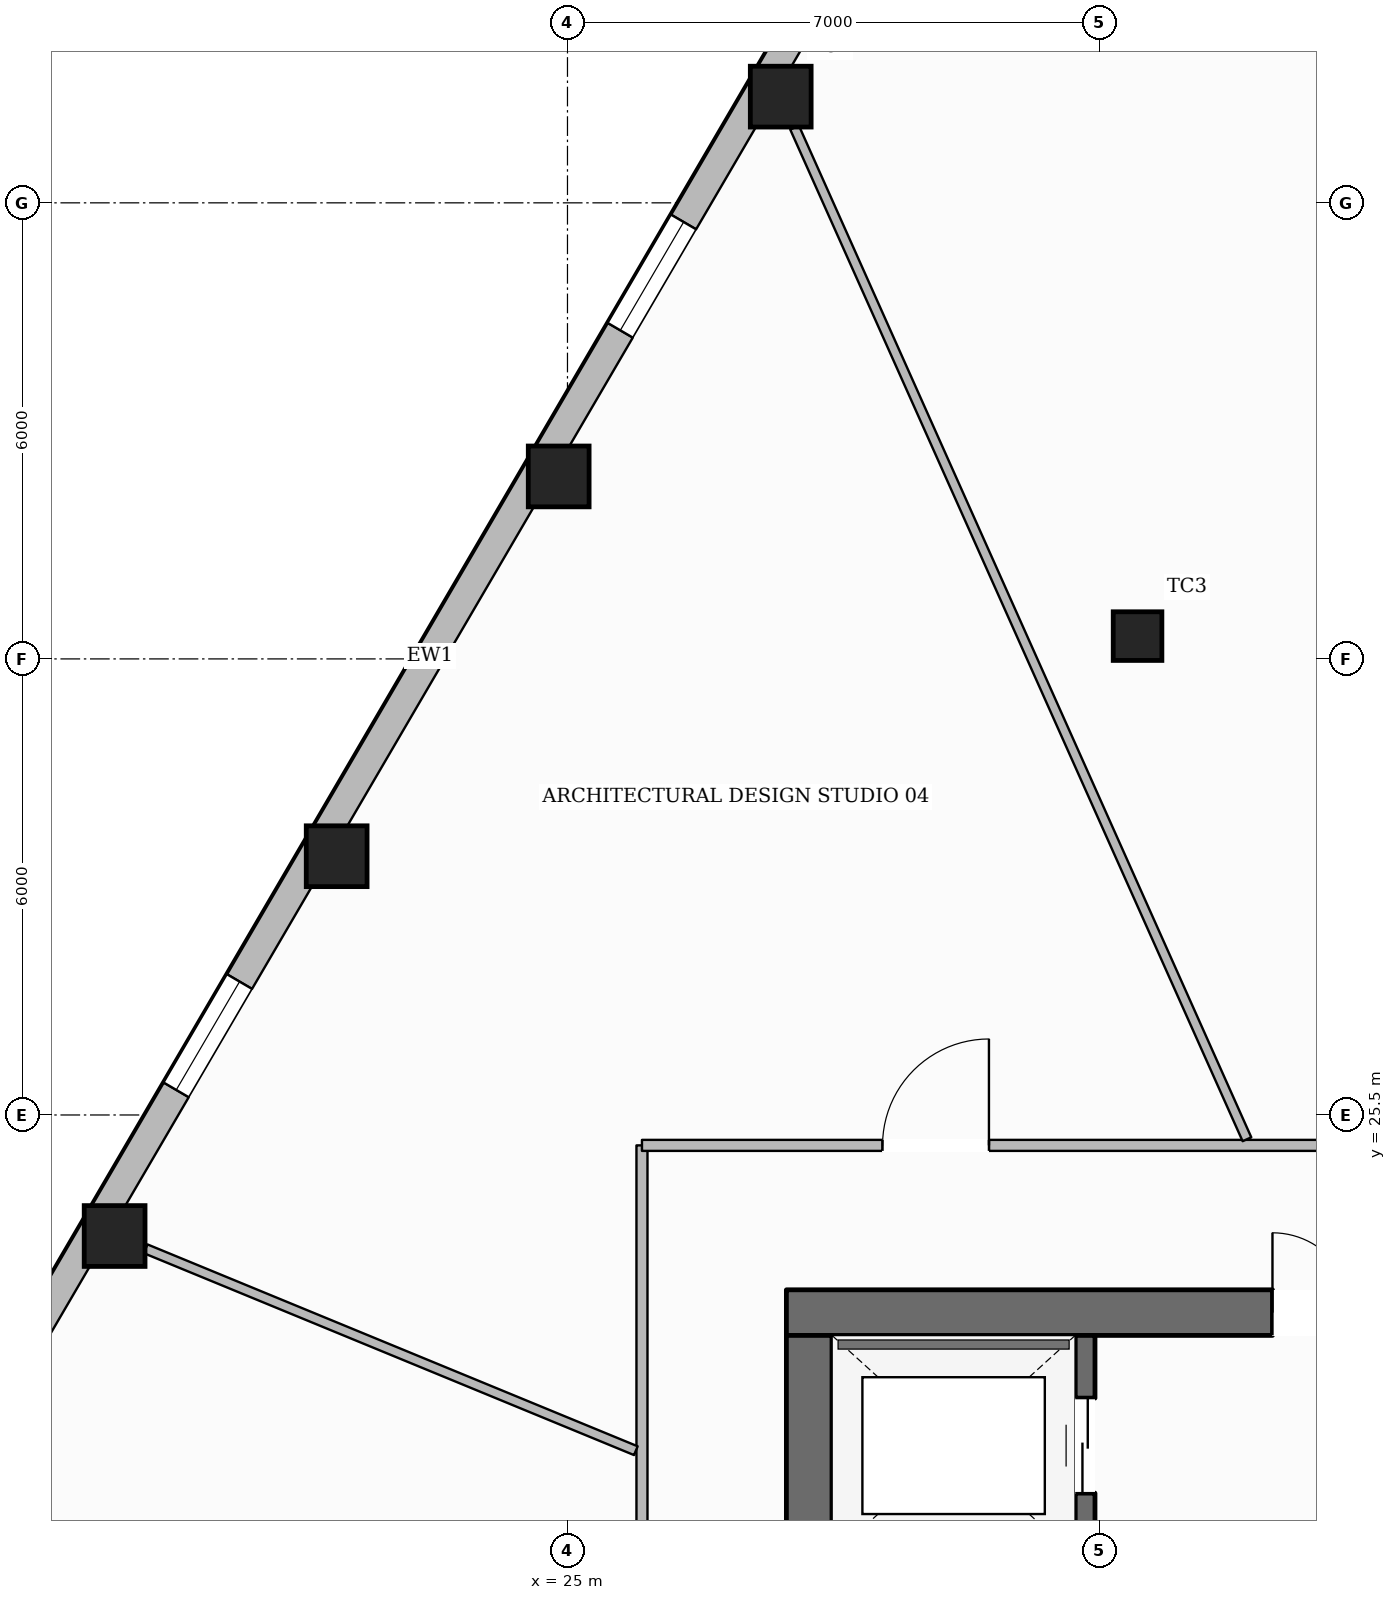
"""IFC4 building model, lengths in metres.
Left out: names, types, materials, properties, quantities, classifications, styles, units other than length and angle.
Written with IfcOpenShell. Run it as: python <this file> out.ifc"""

import sys

from ifc_helpers import new_model, si_unit, direction, frame, frame_2d, origin, origin_2d, place, context, subcontext, project, spatial, rectangle, hollow_rectangle, extrude, element, fill, save


model = new_model("IFC4")
c1 = context("Model", 3, precision=1e-05, world=origin(), true_north=direction((0.0, 1.0)))
c2 = subcontext(c1, "Body", "Model", "MODEL_VIEW")
j1 = project(units=[si_unit("LENGTHUNIT", "METRE"), si_unit("PLANEANGLEUNIT", "RADIAN")], contexts=[c1])
p1 = place(None, origin())
s1 = spatial("IfcSite", under=j1, at=p1, CompositionType="ELEMENT")
p2 = place(p1, origin())
s2 = spatial("IfcBuilding", under=s1, at=p2, CompositionType="ELEMENT")
p3 = place(p2, frame((0.0, 0.0, 59.9)))
s3 = spatial("IfcBuildingStorey", under=s2, at=p3, CompositionType="ELEMENT", Elevation=59.9)
p4 = place(p3, frame((27.88, 22.9, 0.0), z_axis=(0.0, 0.0, 1.0), x_axis=(1.0, 0.0, 0.0)))
e1 = element("IfcWall", 1, at=p4, inside=s3, PredefinedType="SOLIDWALL", context=c2, shape_type="SweptSolid", body=[
    extrude(rectangle(XDim=20.24, YDim=0.6, at=frame_2d((10.12, 0.0))), origin(), (0.0, 0.0, 1.0), 3.59),
])
p5 = place(p4, frame((6.395, 0.0, 0.0)))
e2 = element("IfcOpeningElement", 2, at=p5, cuts=e1, PredefinedType="OPENING", context=c2, shape_type="SweptSolid", body=[
    extrude(rectangle(XDim=1.05, YDim=2.15, at=frame_2d((0.525, 1.075))), frame((0.0, 0.31, 0.0), z_axis=(0.0, -1.0, 0.0), x_axis=(1.0, 0.0, 0.0)), (0.0, 0.0, 1.0), 0.62),
])
p6 = place(p4, frame((12.795, 0.0, 0.0)))
e3 = element("IfcOpeningElement", 3, at=p6, cuts=e1, PredefinedType="OPENING", context=c2, shape_type="SweptSolid", body=[
    extrude(rectangle(XDim=1.05, YDim=2.15, at=frame_2d((0.525, 1.075))), frame((0.0, 0.31, 0.0), z_axis=(0.0, -1.0, 0.0), x_axis=(1.0, 0.0, 0.0)), (0.0, 0.0, 1.0), 0.62),
])
p7 = place(p3, frame((28.18, 9.6, 0.0), z_axis=(0.0, 0.0, 1.0), x_axis=(0.0, 1.0, 0.0)))
e4 = element("IfcWall", 4, at=p7, inside=s3, PredefinedType="SOLIDWALL", context=c2, shape_type="SweptSolid", body=[
    extrude(rectangle(XDim=13.0, YDim=0.6, at=frame_2d((6.5, 0.0))), origin(), (0.0, 0.0, 1.0), 3.59),
])
p8 = place(p7, frame((0.2, 0.0, 0.0)))
e5 = element("IfcOpeningElement", 5, at=p8, cuts=e4, PredefinedType="OPENING", context=c2, shape_type="SweptSolid", body=[
    extrude(rectangle(XDim=1.1, YDim=2.15, at=frame_2d((0.55, 1.075))), frame((0.0, 0.31, 0.0), z_axis=(0.0, -1.0, 0.0), x_axis=(1.0, 0.0, 0.0)), (0.0, 0.0, 1.0), 0.62),
])
p9 = place(p7, frame((8.4, 0.0, 0.0)))
e6 = element("IfcOpeningElement", 6, at=p9, cuts=e4, PredefinedType="OPENING", context=c2, shape_type="SweptSolid", body=[
    extrude(rectangle(XDim=0.9, YDim=2.1, at=frame_2d((0.45, 1.05))), frame((0.0, 0.31, 0.0), z_axis=(0.0, -1.0, 0.0), x_axis=(1.0, 0.0, 0.0)), (0.0, 0.0, 1.0), 0.62),
])
p10 = place(p3, frame((31.81, 9.6, 0.0), z_axis=(0.0, 0.0, 1.0), x_axis=(0.0, 1.0, 0.0)))
e7 = element("IfcWall", 7, at=p10, inside=s3, PredefinedType="SHEAR", context=c2, shape_type="SweptSolid", body=[
    extrude(rectangle(XDim=13.0, YDim=0.26, at=frame_2d((6.5, 0.0))), origin(), (0.0, 0.0, 1.0), 3.59),
])
p11 = place(p10, frame((10.925, 0.0, 0.0)))
e8 = element("IfcOpeningElement", 8, at=p11, cuts=e7, PredefinedType="OPENING", context=c2, shape_type="SweptSolid", body=[
    extrude(rectangle(XDim=1.25, YDim=2.25, at=frame_2d((0.625, 1.125))), frame((0.0, 0.14, 0.0), z_axis=(0.0, -1.0, 0.0), x_axis=(1.0, 0.0, 0.0)), (0.0, 0.0, 1.0), 0.28),
])
for number, where, z_axis, x_axis in (
    (9, (27.805, 38.897, 0.0), (0.0, 0.0, 1.0), (1.0, 0.0, 0.0)),
    (10, (24.885, 33.901, 0.0), (0.0, 0.0, 1.0), (1.0, 0.0, 0.0)),
    (11, (21.963, 28.904, 0.0), (0.0, 0.0, 1.0), (1.0, 0.0, 0.0)),
    (12, (19.042, 23.908, 0.0), (0.0, 0.0, 1.0), (1.0, 0.0, 0.0)),
):
    element("IfcColumn", number, at=place(p3, frame(where, z_axis=z_axis, x_axis=x_axis)), inside=s3, PredefinedType="COLUMN", context=c2, shape_type="SweptSolid", body=[
        extrude(hollow_rectangle(XDim=0.8, YDim=0.8, WallThickness=0.036, at=origin_2d()), origin(), (0.0, 0.0, 1.0), 3.59),
    ])
p12 = place(p3, frame((32.5, 31.8, 0.0), z_axis=(0.0, 0.0, 1.0), x_axis=(1.0, 0.0, 0.0)))
e13 = element("IfcColumn", 13, at=p12, inside=s3, PredefinedType="COLUMN", context=c2, shape_type="SweptSolid", body=[
    extrude(hollow_rectangle(XDim=0.64, YDim=0.64, WallThickness=0.028, at=origin_2d()), origin(), (0.0, 0.0, 1.0), 3.59),
])
p13 = place(p3, frame((12.724, 13.636, 0.0), z_axis=(0.0, 0.0, 1.0), x_axis=(0.504702471056, 0.863293354376, 0.0)))
e14 = element("IfcWall", 14, at=p13, inside=s3, PredefinedType="STANDARD", context=c2, shape_type="SweptSolid", body=[
    extrude(rectangle(XDim=35.682, YDim=0.38, at=frame_2d((17.841, 0.0))), origin(), (0.0, 0.0, 1.0), 2.97),
])
p14 = place(p13, frame((31.488, 0.0, 0.65)))
e15 = element("IfcOpeningElement", 15, at=p14, cuts=e14, PredefinedType="OPENING", context=c2, shape_type="SweptSolid", body=[
    extrude(rectangle(XDim=1.65, YDim=1.75, at=frame_2d((0.825, 0.875))), frame((0.0, 0.2, 0.0), z_axis=(0.0, -1.0, 0.0), x_axis=(1.0, 0.0, 0.0)), (0.0, 0.0, 1.0), 0.4),
])
p15 = place(p13, frame((25.701, 0.0, 0.65)))
e16 = element("IfcOpeningElement", 16, at=p15, cuts=e14, PredefinedType="OPENING", context=c2, shape_type="SweptSolid", body=[
    extrude(rectangle(XDim=1.65, YDim=1.75, at=frame_2d((0.825, 0.875))), frame((0.0, 0.2, 0.0), z_axis=(0.0, -1.0, 0.0), x_axis=(1.0, 0.0, 0.0)), (0.0, 0.0, 1.0), 0.4),
])
p16 = place(p13, frame((14.125, 0.0, 0.65)))
e17 = element("IfcOpeningElement", 17, at=p16, cuts=e14, PredefinedType="OPENING", context=c2, shape_type="SweptSolid", body=[
    extrude(rectangle(XDim=1.65, YDim=1.75, at=frame_2d((0.825, 0.875))), frame((0.0, 0.2, 0.0), z_axis=(0.0, -1.0, 0.0), x_axis=(1.0, 0.0, 0.0)), (0.0, 0.0, 1.0), 0.4),
])
p17 = place(p13, frame((8.337, 0.0, 0.65)))
e18 = element("IfcOpeningElement", 18, at=p17, cuts=e14, PredefinedType="OPENING", context=c2, shape_type="SweptSolid", body=[
    extrude(rectangle(XDim=1.65, YDim=1.75, at=frame_2d((0.825, 0.875))), frame((0.0, 0.2, 0.0), z_axis=(0.0, -1.0, 0.0), x_axis=(1.0, 0.0, 0.0)), (0.0, 0.0, 1.0), 0.4),
])
p18 = place(p13, frame((2.549, 0.0, 0.65)))
e19 = element("IfcOpeningElement", 19, at=p18, cuts=e14, PredefinedType="OPENING", context=c2, shape_type="SweptSolid", body=[
    extrude(rectangle(XDim=1.65, YDim=1.75, at=frame_2d((0.825, 0.875))), frame((0.0, 0.2, 0.0), z_axis=(0.0, -1.0, 0.0), x_axis=(1.0, 0.0, 0.0)), (0.0, 0.0, 1.0), 0.4),
])
p19 = place(p3, frame((25.98, 9.1, 0.0), z_axis=(0.0, 0.0, 1.0), x_axis=(0.0, 1.0, 0.0)))
e20 = element("IfcWall", 20, at=p19, inside=s3, PredefinedType="PARTITIONING", context=c2, shape_type="SweptSolid", body=[
    extrude(rectangle(XDim=16.0, YDim=0.145, at=frame_2d((8.0, 0.0))), origin(), (0.0, 0.0, 1.0), 3.278),
])
p20 = place(p19, frame((5.575, 0.0, 0.0)))
e21 = element("IfcOpeningElement", 21, at=p20, cuts=e20, PredefinedType="OPENING", context=c2, shape_type="SweptSolid", body=[
    extrude(rectangle(XDim=1.4, YDim=2.2, at=frame_2d((0.7, 1.1))), frame((0.0, 0.083, 0.0), z_axis=(0.0, -1.0, 0.0), x_axis=(1.0, 0.0, 0.0)), (0.0, 0.0, 1.0), 0.165),
])
p21 = place(p3, frame((25.98, 25.1, 0.0), z_axis=(0.0, 0.0, 1.0), x_axis=(1.0, 0.0, 0.0)))
e22 = element("IfcWall", 22, at=p21, inside=s3, PredefinedType="PARTITIONING", context=c2, shape_type="SweptSolid", body=[
    extrude(rectangle(XDim=11.02, YDim=0.145, at=frame_2d((5.51, 0.0))), origin(), (0.0, 0.0, 1.0), 3.59),
])
p22 = place(p21, frame((3.165, 0.0, 0.0)))
e23 = element("IfcOpeningElement", 23, at=p22, cuts=e22, PredefinedType="OPENING", context=c2, shape_type="SweptSolid", body=[
    extrude(rectangle(XDim=1.4, YDim=2.2, at=frame_2d((0.7, 1.1))), frame((0.0, 0.083, 0.0), z_axis=(0.0, -1.0, 0.0), x_axis=(1.0, 0.0, 0.0)), (0.0, 0.0, 1.0), 0.165),
])
p23 = place(p3, frame((33.939, 25.18, 0.0), z_axis=(0.0, 0.0, 1.0), x_axis=(-0.408221011752, 0.912883128097, 0.0)))
e24 = element("IfcWall", 24, at=p23, inside=s3, PredefinedType="PARTITIONING", context=c2, shape_type="SweptSolid", body=[
    extrude(rectangle(XDim=14.579, YDim=0.125, at=frame_2d((7.29, 0.0))), origin(), (0.0, 0.0, 1.0), 3.057),
])
p24 = place(p3, frame((25.899, 21.083, 0.0), z_axis=(0.0, 0.0, 1.0), x_axis=(-0.924655624126, 0.380804381241, 0.0)))
e25 = element("IfcWall", 25, at=p24, inside=s3, PredefinedType="PARTITIONING", context=c2, shape_type="SweptSolid", body=[
    extrude(rectangle(XDim=6.975, YDim=0.125, at=frame_2d((3.487, 0.0))), origin(), (0.0, 0.0, 1.0), 3.057),
])
p25 = place(p15, origin())
e26 = element("IfcWindow", 26, at=p25, inside=s3, PartitioningType="SINGLE_PANEL", PredefinedType="WINDOW", context=c2, shape_type="SweptSolid", body=[
    extrude(rectangle(XDim=1.65, YDim=1.75, at=frame_2d((0.825, 0.875))), frame((0.0, 0.03, 0.0), z_axis=(0.0, -1.0, 0.0), x_axis=(1.0, 0.0, 0.0)), (0.0, 0.0, 1.0), 0.06),
])
fill(e16, e26)
p26 = place(p16, origin())
e27 = element("IfcWindow", 27, at=p26, inside=s3, PartitioningType="SINGLE_PANEL", PredefinedType="WINDOW", context=c2, shape_type="SweptSolid", body=[
    extrude(rectangle(XDim=1.65, YDim=1.75, at=frame_2d((0.825, 0.875))), frame((0.0, 0.03, 0.0), z_axis=(0.0, -1.0, 0.0), x_axis=(1.0, 0.0, 0.0)), (0.0, 0.0, 1.0), 0.06),
])
fill(e17, e27)
p27 = place(p5, origin())
e28 = element("IfcDoor", 28, at=p27, inside=s3, OperationType="SINGLE_SWING_LEFT", PredefinedType="DOOR", context=c2, shape_type="SweptSolid", body=[
    extrude(rectangle(XDim=1.05, YDim=2.15, at=frame_2d((0.525, 1.075))), frame((0.0, 0.025, 0.0), z_axis=(0.0, -1.0, 0.0), x_axis=(1.0, 0.0, 0.0)), (0.0, 0.0, 1.0), 0.05),
])
fill(e2, e28)
p28 = place(p11, origin())
e29 = element("IfcDoor", 29, at=p28, inside=s3, OperationType="DOUBLE_DOOR_SLIDING", PredefinedType="DOOR", context=c2, shape_type="SweptSolid", body=[
    extrude(rectangle(XDim=1.25, YDim=2.25, at=frame_2d((0.625, 1.125))), frame((0.0, 0.025, 0.0), z_axis=(0.0, -1.0, 0.0), x_axis=(1.0, 0.0, 0.0)), (0.0, 0.0, 1.0), 0.05),
])
fill(e8, e29)
p29 = place(p22, origin())
e30 = element("IfcDoor", 30, at=p29, inside=s3, OperationType="SINGLE_SWING_RIGHT", PredefinedType="DOOR", context=c2, shape_type="SweptSolid", body=[
    extrude(rectangle(XDim=1.4, YDim=2.2, at=frame_2d((0.7, 1.1))), frame((0.0, 0.025, 0.0), z_axis=(0.0, -1.0, 0.0), x_axis=(1.0, 0.0, 0.0)), (0.0, 0.0, 1.0), 0.05),
])
fill(e23, e30)
save(model, sys.argv[1])
